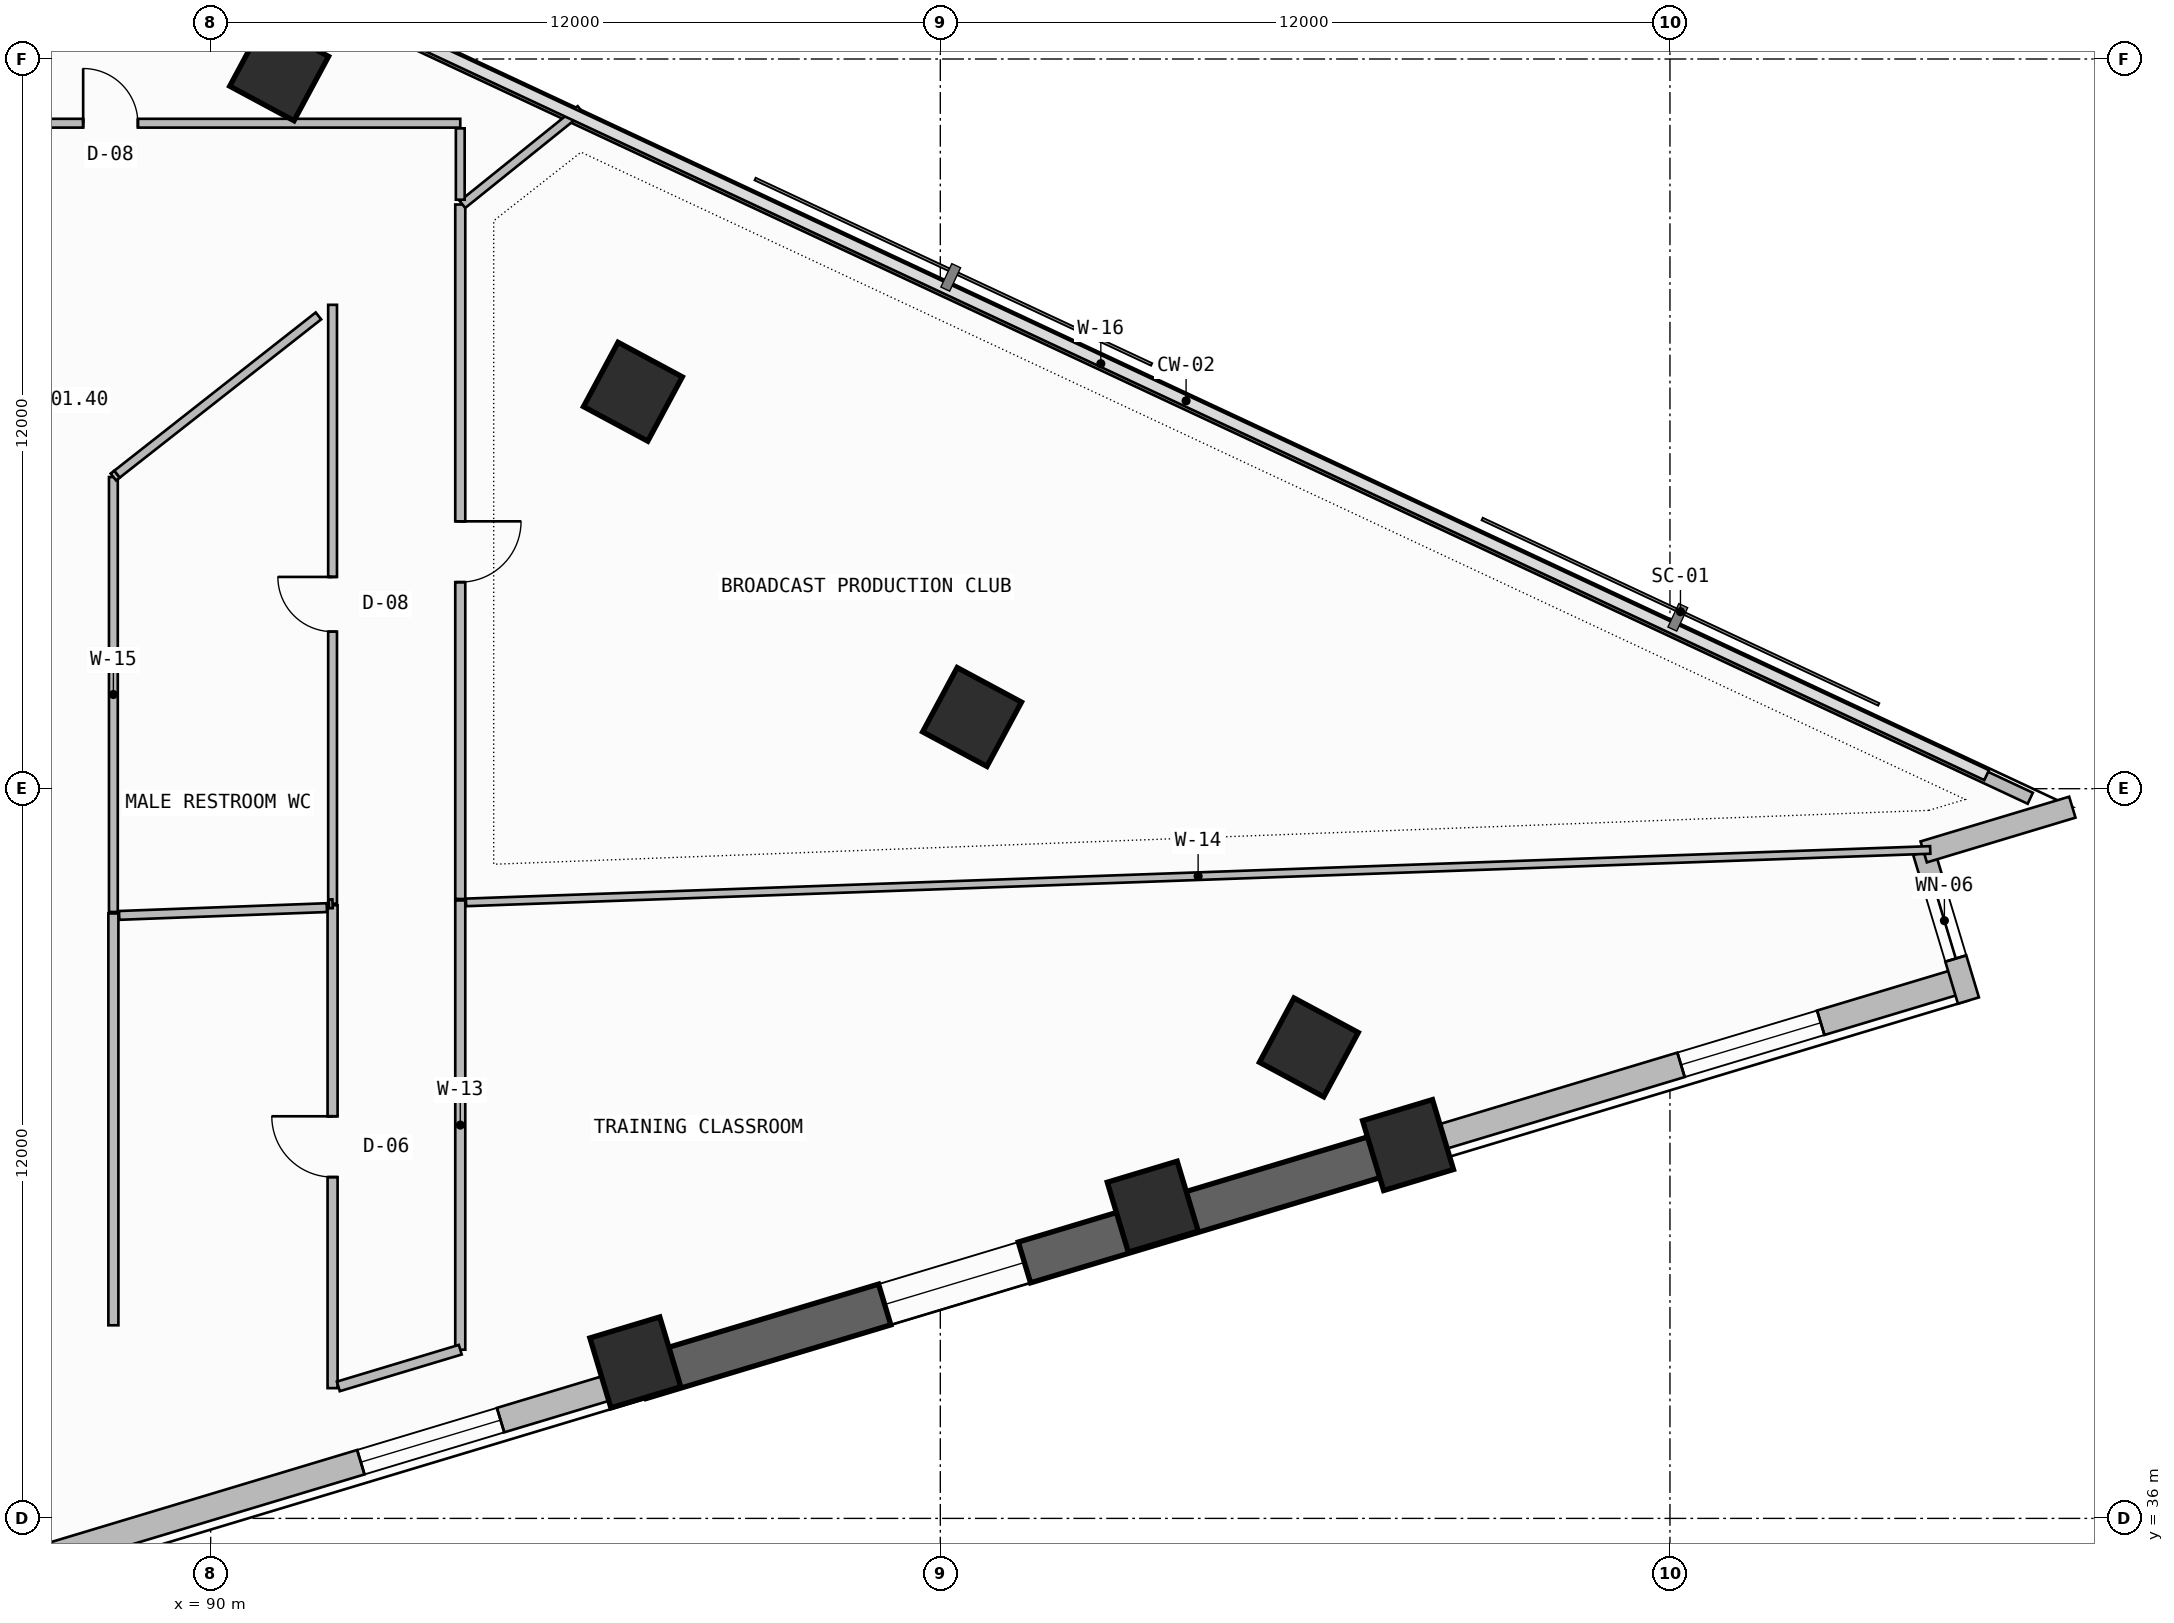
"""IFC4 building model, lengths in metres.
Left out: names, types, materials, properties, quantities, classifications, styles, units other than length and angle.
Written with IfcOpenShell. Run it as: python <this file> out.ifc"""

import sys

from ifc_helpers import new_model, si_unit, direction, frame, frame_2d, origin, origin_2d, place, context, subcontext, project, spatial, rectangle, extrude, element, fill, save


model = new_model("IFC4")
c1 = context("Model", 3, precision=1e-05, world=origin(), true_north=direction((0.0, 1.0)))
c2 = subcontext(c1, "Body", "Model", "MODEL_VIEW")
j1 = project(units=[si_unit("LENGTHUNIT", "METRE"), si_unit("PLANEANGLEUNIT", "RADIAN")], contexts=[c1])
p1 = place(None, origin())
s1 = spatial("IfcSite", under=j1, at=p1, CompositionType="ELEMENT")
p2 = place(p1, origin())
s2 = spatial("IfcBuilding", under=s1, at=p2, CompositionType="ELEMENT")
p3 = place(p2, frame((0.0, 0.0, 143.1)))
s3 = spatial("IfcBuildingStorey", under=s2, at=p3, CompositionType="ELEMENT", Elevation=143.1)
for number, where, z_axis, x_axis in (
    (1, (96.985, 38.565, 0.0), (0.0, 0.0, 1.0), (0.958, 0.288, 0.0)),
    (2, (105.494, 41.126, 0.0), (0.0, 0.0, 1.0), (0.958, 0.288, 0.0)),
    (3, (109.693, 42.139, 0.0), (0.0, 0.0, 1.0), (0.958, 0.288, 0.0)),
    (4, (108.061, 43.746, 0.0), (0.0, 0.0, 1.0), (0.473, 0.881, 0.0)),
    (5, (102.522, 49.179, 0.0), (0.0, 0.0, 1.0), (0.473, 0.881, 0.0)),
    (6, (96.944, 54.528, 0.0), (0.0, 0.0, 1.0), (0.473, 0.881, 0.0)),
    (7, (91.126, 59.798, 0.0), (0.0, 0.0, 1.0), (0.473, 0.881, 0.0)),
):
    element("IfcColumn", number, at=place(p3, frame(where, z_axis=z_axis, x_axis=x_axis)), inside=s3, PredefinedType="COLUMN", context=c2, shape_type="SweptSolid", body=[
        extrude(rectangle(XDim=1.2, YDim=1.2, at=origin_2d()), origin(), (0.0, 0.0, 1.0), 3.6),
    ])
p4 = place(p3, frame((86.1, 35.007, 0.0), z_axis=(0.0, 0.0, 1.0), x_axis=(0.957569401796, 0.288202777129, 0.0)))
e8 = element("IfcWall", 8, at=p4, inside=s3, PredefinedType="SOLIDWALL", context=c2, shape_type="SweptSolid", body=[
    extrude(rectangle(XDim=11.448, YDim=0.42, at=frame_2d((5.724, 0.0))), origin(), (0.0, 0.0, 1.0), 2.325),
])
p5 = place(p4, frame((6.652, 0.0, 1.2)))
e9 = element("IfcOpeningElement", 9, at=p5, cuts=e8, PredefinedType="OPENING", context=c2, shape_type="SweptSolid", body=[
    extrude(rectangle(XDim=2.4, YDim=0.9, at=frame_2d((1.2, 0.45))), frame((0.0, 0.22, 0.0), z_axis=(0.0, -1.0, 0.0), x_axis=(1.0, 0.0, 0.0)), (0.0, 0.0, 1.0), 0.44),
])
p6 = place(p3, frame((97.062, 38.307, -0.26), z_axis=(0.0, 0.0, 1.0), x_axis=(0.957569832102, 0.288201347408, 0.0)))
e10 = element("IfcWall", 10, at=p6, inside=s3, PredefinedType="SHEAR", context=c2, shape_type="SweptSolid", body=[
    extrude(rectangle(XDim=13.199, YDim=0.7, at=frame_2d((6.6, 0.0))), origin(), (0.0, 0.0, 1.0), 3.6),
])
p7 = place(p6, frame((4.201, 0.0, 1.2)))
e11 = element("IfcOpeningElement", 11, at=p7, cuts=e10, PredefinedType="OPENING", context=c2, shape_type="SweptSolid", body=[
    extrude(rectangle(XDim=2.4, YDim=0.9, at=frame_2d((1.2, 0.45))), frame((0.0, 0.36, 0.0), z_axis=(0.0, -1.0, 0.0), x_axis=(1.0, 0.0, 0.0)), (0.0, 0.0, 1.0), 0.72),
])
p8 = place(p3, frame((109.701, 42.111, 0.0), z_axis=(0.0, 0.0, 1.0), x_axis=(0.957575807765, 0.288181492091, 0.0)))
e12 = element("IfcWall", 12, at=p8, inside=s3, PredefinedType="SOLIDWALL", context=c2, shape_type="SweptSolid", body=[
    extrude(rectangle(XDim=9.51, YDim=0.42, at=frame_2d((4.755, 0.0))), origin(), (0.0, 0.0, 1.0), 2.325),
])
p9 = place(p8, frame((4.679, 0.0, 1.2)))
e13 = element("IfcOpeningElement", 13, at=p9, cuts=e12, PredefinedType="OPENING", context=c2, shape_type="SweptSolid", body=[
    extrude(rectangle(XDim=2.4, YDim=0.9, at=frame_2d((1.2, 0.45))), frame((0.0, 0.22, 0.0), z_axis=(0.0, -1.0, 0.0), x_axis=(1.0, 0.0, 0.0)), (0.0, 0.0, 1.0), 0.44),
])
p10 = place(p3, frame((118.909, 44.516, 0.0), z_axis=(0.0, 0.0, 1.0), x_axis=(-0.288172590882, 0.95757848653, 0.0)))
e14 = element("IfcWall", 14, at=p10, inside=s3, PredefinedType="SOLIDWALL", context=c2, shape_type="SweptSolid", body=[
    extrude(rectangle(XDim=2.553, YDim=0.36, at=frame_2d((1.276, 0.0))), origin(), (0.0, 0.0, 1.0), 3.34),
])
p11 = place(p10, frame((0.722, 0.0, 0.45)))
e15 = element("IfcOpeningElement", 15, at=p11, cuts=e14, PredefinedType="OPENING", context=c2, shape_type="SweptSolid", body=[
    extrude(rectangle(XDim=1.3, YDim=2.4, at=frame_2d((0.65, 1.2))), frame((0.0, 0.19, 0.0), z_axis=(0.0, -1.0, 0.0), x_axis=(1.0, 0.0, 0.0)), (0.0, 0.0, 1.0), 0.38),
])
p12 = place(p3, frame((118.173, 46.96, 0.0), z_axis=(0.0, 0.0, 1.0), x_axis=(0.95757848653, 0.288172590882, 0.0)))
e16 = element("IfcWall", 16, at=p12, inside=s3, PredefinedType="SOLIDWALL", context=c2, shape_type="SweptSolid", body=[
    extrude(rectangle(XDim=2.553, YDim=0.36, at=frame_2d((1.276, 0.0))), origin(), (0.0, 0.0, 1.0), 3.34),
])
p13 = place(p3, frame((119.926, 47.843, 0.0), z_axis=(0.0, 0.0, 1.0), x_axis=(-0.905880730846, 0.423532881228, 0.0)))
e17 = element("IfcWall", 17, at=p13, inside=s3, PredefinedType="PARAPET", context=c2, shape_type="SweptSolid", body=[
    extrude(rectangle(XDim=33.748, YDim=0.2, at=frame_2d((16.874, 0.0))), origin(), (0.0, 0.0, 1.0), 1.15),
])
p14 = place(p3, frame((92.005, 46.084, 0.0), z_axis=(0.0, 0.0, 1.0), x_axis=(0.0, -1.0, 0.0)))
e18 = element("IfcWall", 18, at=p14, inside=s3, PredefinedType="PARTITIONING", context=c2, shape_type="SweptSolid", body=[
    extrude(rectangle(XDim=7.942, YDim=0.165, at=frame_2d((3.971, 0.0))), origin(), (0.0, 0.0, 1.0), 2.725),
])
p15 = place(p14, frame((3.471, 0.0, 0.0)))
e19 = element("IfcOpeningElement", 19, at=p15, cuts=e18, PredefinedType="OPENING", context=c2, shape_type="SweptSolid", body=[
    extrude(rectangle(XDim=1.0, YDim=2.2, at=frame_2d((0.5, 1.1))), frame((0.0, 0.093, 0.0), z_axis=(0.0, -1.0, 0.0), x_axis=(1.0, 0.0, 0.0)), (0.0, 0.0, 1.0), 0.185),
])
p16 = place(p3, frame((94.105, 38.774, 0.0), z_axis=(0.0, 0.0, 1.0), x_axis=(0.0, 1.0, 0.0)))
e20 = element("IfcWall", 20, at=p16, inside=s3, PredefinedType="PARTITIONING", context=c2, shape_type="SweptSolid", body=[
    extrude(rectangle(XDim=7.388, YDim=0.165, at=frame_2d((3.694, 0.0))), origin(), (0.0, 0.0, 1.0), 2.725),
])
p17 = place(p3, frame((88.4, 39.176, 0.0), z_axis=(0.0, 0.0, 1.0), x_axis=(0.0, 1.0, 0.0)))
e21 = element("IfcWall", 21, at=p17, inside=s3, PredefinedType="PARTITIONING", context=c2, shape_type="SweptSolid", body=[
    extrude(rectangle(XDim=6.773, YDim=0.165, at=frame_2d((3.386, 0.0))), origin(), (0.0, 0.0, 1.0), 2.725),
])
p18 = place(p3, frame((92.1, 38.17, 0.0), z_axis=(0.0, 0.0, 1.0), x_axis=(0.957543477101, 0.288288899303, 0.0)))
e22 = element("IfcWall", 22, at=p18, inside=s3, PredefinedType="PARTITIONING", context=c2, shape_type="SweptSolid", body=[
    extrude(rectangle(XDim=2.094, YDim=0.165, at=frame_2d((1.047, 0.0))), origin(), (0.0, 0.0, 1.0), 3.34),
])
p19 = place(p3, frame((94.199, 46.13, 0.0), z_axis=(0.0, 0.0, 1.0), x_axis=(0.999359118805, 0.035795972695, 0.0)))
e23 = element("IfcWall", 23, at=p19, inside=s3, PredefinedType="PARTITIONING", context=c2, shape_type="SweptSolid", body=[
    extrude(rectangle(XDim=24.096, YDim=0.125, at=frame_2d((12.048, 0.0))), origin(), (0.0, 0.0, 1.0), 2.725),
])
p20 = place(p3, frame((88.494, 45.916, 0.0), z_axis=(0.0, 0.0, 1.0), x_axis=(0.999296813143, 0.037495056239, 0.0)))
e24 = element("IfcWall", 24, at=p20, inside=s3, PredefinedType="PARTITIONING", context=c2, shape_type="SweptSolid", body=[
    extrude(rectangle(XDim=3.418, YDim=0.145, at=frame_2d((1.709, 0.0))), origin(), (0.0, 0.0, 1.0), 3.34),
])
p21 = place(p3, frame((94.105, 46.187, 0.0), z_axis=(0.0, 0.0, 1.0), x_axis=(0.0, 1.0, 0.0)))
e25 = element("IfcWall", 25, at=p21, inside=s3, PredefinedType="PARTITIONING", context=c2, shape_type="SweptSolid", body=[
    extrude(rectangle(XDim=11.42, YDim=0.165, at=frame_2d((5.71, 0.0))), origin(), (0.0, 0.0, 1.0), 2.725),
])
p22 = place(p21, frame((5.21, 0.0, 0.0)))
e26 = element("IfcOpeningElement", 26, at=p22, cuts=e25, PredefinedType="OPENING", context=c2, shape_type="SweptSolid", body=[
    extrude(rectangle(XDim=1.0, YDim=2.2, at=frame_2d((0.5, 1.1))), frame((0.0, 0.093, 0.0), z_axis=(0.0, -1.0, 0.0), x_axis=(1.0, 0.0, 0.0)), (0.0, 0.0, 1.0), 0.185),
])
p23 = place(p3, frame((94.142, 57.607, 0.0), z_axis=(0.0, 0.0, 1.0), x_axis=(0.77909579135, 0.626904895419, 0.0)))
e27 = element("IfcWall", 27, at=p23, inside=s3, PredefinedType="PARTITIONING", context=c2, shape_type="SweptSolid", body=[
    extrude(rectangle(XDim=2.49, YDim=0.145, at=frame_2d((1.245, 0.0))), origin(), (0.0, 0.0, 1.0), 3.34),
])
p24 = place(p3, frame((92.005, 55.958, 0.0), z_axis=(0.0, 0.0, 1.0), x_axis=(0.0, -1.0, 0.0)))
e28 = element("IfcWall", 28, at=p24, inside=s3, PredefinedType="PARTITIONING", context=c2, shape_type="SweptSolid", body=[
    extrude(rectangle(XDim=9.85, YDim=0.145, at=frame_2d((4.925, 0.0))), origin(), (0.0, 0.0, 1.0), 2.725),
])
p25 = place(p24, frame((4.475, 0.0, 0.0)))
e29 = element("IfcOpeningElement", 29, at=p25, cuts=e28, PredefinedType="OPENING", context=c2, shape_type="SweptSolid", body=[
    extrude(rectangle(XDim=0.9, YDim=2.1, at=frame_2d((0.45, 1.05))), frame((0.0, 0.083, 0.0), z_axis=(0.0, -1.0, 0.0), x_axis=(1.0, 0.0, 0.0)), (0.0, 0.0, 1.0), 0.165),
])
p26 = place(p3, frame((88.4, 45.972, 0.0), z_axis=(0.0, 0.0, 1.0), x_axis=(0.0, 1.0, 0.0)))
e30 = element("IfcWall", 30, at=p26, inside=s3, PredefinedType="PARTITIONING", context=c2, shape_type="SweptSolid", body=[
    extrude(rectangle(XDim=7.153, YDim=0.145, at=frame_2d((3.577, 0.0))), origin(), (0.0, 0.0, 1.0), 3.34),
])
p27 = place(p3, frame((88.4, 53.125, 0.0), z_axis=(0.0, 0.0, 1.0), x_axis=(0.785209472927, 0.619230234747, 0.0)))
e31 = element("IfcWall", 31, at=p27, inside=s3, PredefinedType="PARTITIONING", context=c2, shape_type="SweptSolid", body=[
    extrude(rectangle(XDim=0.076, YDim=0.145, at=frame_2d((0.038, 0.0))), origin(), (0.0, 0.0, 1.0), 3.34),
])
p28 = place(p3, frame((92.005, 46.108, 0.0), z_axis=(0.0, 0.0, 1.0), x_axis=(-0.999168053101, -0.040782369514, 0.0)))
e32 = element("IfcWall", 32, at=p28, inside=s3, PredefinedType="PARTITIONING", context=c2, shape_type="SweptSolid", body=[
    extrude(rectangle(XDim=0.06, YDim=0.145, at=frame_2d((0.03, 0.0))), origin(), (0.0, 0.0, 1.0), 3.34),
])
p29 = place(p3, frame((94.105, 58.944, 0.0), z_axis=(0.0, 0.0, 1.0), x_axis=(-1.0, 0.0, 0.0)))
e33 = element("IfcWall", 33, at=p29, inside=s3, PredefinedType="PARTITIONING", context=c2, shape_type="SweptSolid", body=[
    extrude(rectangle(XDim=11.504, YDim=0.145, at=frame_2d((5.752, 0.0))), origin(), (0.0, 0.0, 1.0), 2.725),
])
p30 = place(p29, frame((5.302, 0.0, 0.0)))
e34 = element("IfcOpeningElement", 34, at=p30, cuts=e33, PredefinedType="OPENING", context=c2, shape_type="SweptSolid", body=[
    extrude(rectangle(XDim=0.9, YDim=2.1, at=frame_2d((0.45, 1.05))), frame((0.0, 0.083, 0.0), z_axis=(0.0, -1.0, 0.0), x_axis=(1.0, 0.0, 0.0)), (0.0, 0.0, 1.0), 0.165),
])
p31 = place(p3, frame((94.105, 57.686, 0.0), z_axis=(0.0, 0.0, 1.0), x_axis=(0.0, 1.0, 0.0)))
e35 = element("IfcWall", 35, at=p31, inside=s3, PredefinedType="PARTITIONING", context=c2, shape_type="SweptSolid", body=[
    extrude(rectangle(XDim=1.174, YDim=0.145, at=frame_2d((0.587, 0.0))), origin(), (0.0, 0.0, 1.0), 3.34),
])
p32 = place(p3, frame((88.46, 53.173, 0.0), z_axis=(0.0, 0.0, 1.0), x_axis=(0.786390736742, 0.61772939801, 0.0)))
e36 = element("IfcWall", 36, at=p32, inside=s3, PredefinedType="PARTITIONING", context=c2, shape_type="SweptSolid", body=[
    extrude(rectangle(XDim=4.212, YDim=0.145, at=frame_2d((2.106, 0.0))), origin(), (0.0, 0.0, 1.0), 2.725),
])
p33 = place(p5, origin())
e37 = element("IfcWindow", 37, at=p33, inside=s3, PartitioningType="SINGLE_PANEL", PredefinedType="WINDOW", context=c2, shape_type="SweptSolid", body=[
    extrude(rectangle(XDim=2.4, YDim=0.9, at=frame_2d((1.2, 0.45))), frame((0.0, 0.03, 0.0), z_axis=(0.0, -1.0, 0.0), x_axis=(1.0, 0.0, 0.0)), (0.0, 0.0, 1.0), 0.06),
])
fill(e9, e37)
p34 = place(p7, origin())
e38 = element("IfcWindow", 38, at=p34, inside=s3, PartitioningType="SINGLE_PANEL", PredefinedType="WINDOW", context=c2, shape_type="SweptSolid", body=[
    extrude(rectangle(XDim=2.4, YDim=0.9, at=frame_2d((1.2, 0.45))), frame((0.0, 0.03, 0.0), z_axis=(0.0, -1.0, 0.0), x_axis=(1.0, 0.0, 0.0)), (0.0, 0.0, 1.0), 0.06),
])
fill(e11, e38)
p35 = place(p9, origin())
e39 = element("IfcWindow", 39, at=p35, inside=s3, PartitioningType="SINGLE_PANEL", PredefinedType="WINDOW", context=c2, shape_type="SweptSolid", body=[
    extrude(rectangle(XDim=2.4, YDim=0.9, at=frame_2d((1.2, 0.45))), frame((0.0, 0.03, 0.0), z_axis=(0.0, -1.0, 0.0), x_axis=(1.0, 0.0, 0.0)), (0.0, 0.0, 1.0), 0.06),
])
fill(e13, e39)
p36 = place(p11, origin())
e40 = element("IfcWindow", 40, at=p36, inside=s3, PartitioningType="SINGLE_PANEL", PredefinedType="WINDOW", context=c2, shape_type="SweptSolid", body=[
    extrude(rectangle(XDim=1.3, YDim=2.4, at=frame_2d((0.65, 1.2))), frame((0.0, 0.03, 0.0), z_axis=(0.0, -1.0, 0.0), x_axis=(1.0, 0.0, 0.0)), (0.0, 0.0, 1.0), 0.06),
])
fill(e15, e40)
p37 = place(p15, frame((1.0, 0.0, 0.0), z_axis=(0.0, 0.0, 1.0), x_axis=(-1.0, 0.0, 0.0)))
e41 = element("IfcDoor", 41, at=p37, inside=s3, OperationType="SINGLE_SWING_RIGHT", PredefinedType="DOOR", context=c2, shape_type="SweptSolid", body=[
    extrude(rectangle(XDim=1.0, YDim=2.2, at=frame_2d((0.5, 1.1))), frame((0.0, 0.025, 0.0), z_axis=(0.0, -1.0, 0.0), x_axis=(1.0, 0.0, 0.0)), (0.0, 0.0, 1.0), 0.05),
])
fill(e19, e41)
p38 = place(p22, frame((1.0, 0.0, 0.0), z_axis=(0.0, 0.0, 1.0), x_axis=(-1.0, 0.0, 0.0)))
e42 = element("IfcDoor", 42, at=p38, inside=s3, OperationType="SINGLE_SWING_LEFT", PredefinedType="DOOR", context=c2, shape_type="SweptSolid", body=[
    extrude(rectangle(XDim=1.0, YDim=2.2, at=frame_2d((0.5, 1.1))), frame((0.0, 0.025, 0.0), z_axis=(0.0, -1.0, 0.0), x_axis=(1.0, 0.0, 0.0)), (0.0, 0.0, 1.0), 0.05),
])
fill(e26, e42)
p39 = place(p25, frame((0.9, 0.0, 0.0), z_axis=(0.0, 0.0, 1.0), x_axis=(-1.0, 0.0, 0.0)))
e43 = element("IfcDoor", 43, at=p39, inside=s3, OperationType="SINGLE_SWING_RIGHT", PredefinedType="DOOR", context=c2, shape_type="SweptSolid", body=[
    extrude(rectangle(XDim=0.9, YDim=2.1, at=frame_2d((0.45, 1.05))), frame((0.0, 0.025, 0.0), z_axis=(0.0, -1.0, 0.0), x_axis=(1.0, 0.0, 0.0)), (0.0, 0.0, 1.0), 0.05),
])
fill(e29, e43)
p40 = place(p30, frame((0.9, 0.0, 0.0), z_axis=(0.0, 0.0, 1.0), x_axis=(-1.0, 0.0, 0.0)))
e44 = element("IfcDoor", 44, at=p40, inside=s3, OperationType="SINGLE_SWING_LEFT", PredefinedType="DOOR", context=c2, shape_type="SweptSolid", body=[
    extrude(rectangle(XDim=0.9, YDim=2.1, at=frame_2d((0.45, 1.05))), frame((0.0, 0.025, 0.0), z_axis=(0.0, -1.0, 0.0), x_axis=(1.0, 0.0, 0.0)), (0.0, 0.0, 1.0), 0.05),
])
fill(e34, e44)
save(model, sys.argv[1])
